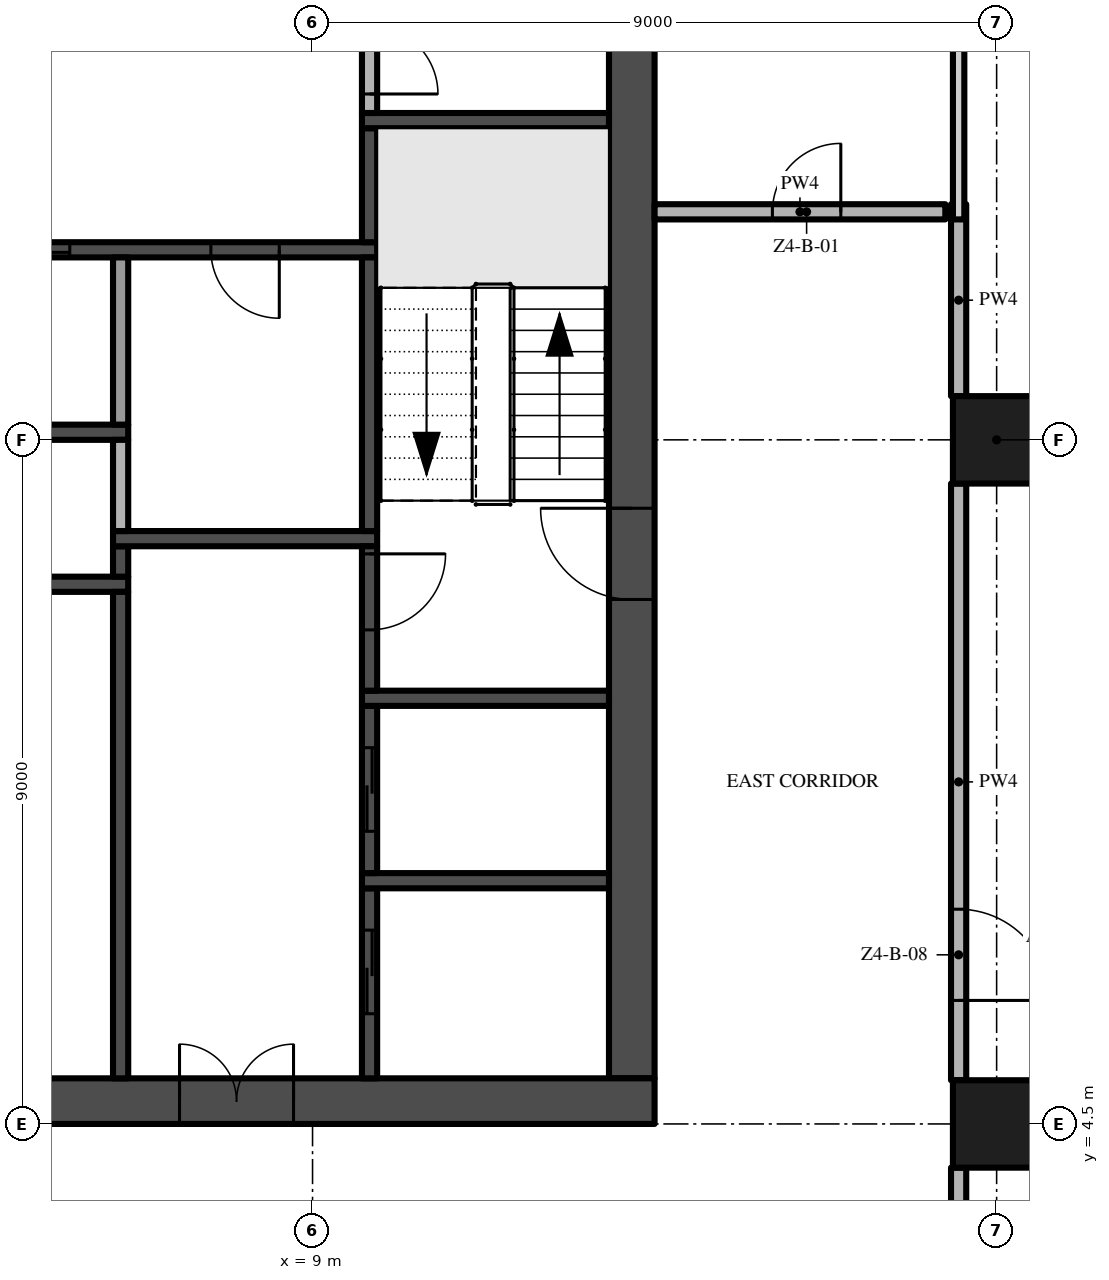
"""IFC4 building model, lengths in metres.
Left out: names, types, materials, properties, quantities, classifications, styles, units other than length and angle.
Written with IfcOpenShell. Run it as: python <this file> out.ifc"""

import sys

from ifc_helpers import new_model, si_unit, direction, frame, frame_2d, origin, origin_2d, place, context, subcontext, project, spatial, rectangle, extrude, element, fill, save


model = new_model("IFC4")
c1 = context("Model", 3, precision=1e-05, world=origin(), true_north=direction((0.0, 1.0)))
c2 = subcontext(c1, "Body", "Model", "MODEL_VIEW")
j1 = project(units=[si_unit("LENGTHUNIT", "METRE"), si_unit("PLANEANGLEUNIT", "RADIAN")], contexts=[c1])
p1 = place(None, origin())
s1 = spatial("IfcSite", under=j1, at=p1, CompositionType="ELEMENT")
p2 = place(p1, origin())
s2 = spatial("IfcBuilding", under=s1, at=p2, CompositionType="ELEMENT")
p3 = place(p2, frame((0.0, 0.0, 195.8)))
s3 = spatial("IfcBuildingStorey", under=s2, at=p3, CompositionType="ELEMENT", Elevation=195.8)
p4 = place(p3, frame((-13.5, 4.8, -0.3), z_axis=(0.0, 0.0, 1.0), x_axis=(1.0, 0.0, 0.0)))
e1 = element("IfcWall", 1, at=p4, inside=s3, PredefinedType="SHEAR", context=c2, shape_type="SweptSolid", body=[
    extrude(rectangle(XDim=27.0, YDim=0.6, at=frame_2d((13.5, 0.0))), origin(), (0.0, 0.0, 1.0), 3.8),
])
p5 = place(p4, frame((12.0, 0.0, 0.3)))
e2 = element("IfcOpeningElement", 2, at=p5, cuts=e1, PredefinedType="OPENING", context=c2, shape_type="SweptSolid", body=[
    extrude(rectangle(XDim=3.0, YDim=2.4, at=frame_2d((1.5, 1.2))), frame((0.0, 0.31, 0.0), z_axis=(0.0, -1.0, 0.0), x_axis=(1.0, 0.0, 0.0)), (0.0, 0.0, 1.0), 0.62),
])
p6 = place(p4, frame((4.9, 0.0, 0.3)))
e3 = element("IfcOpeningElement", 3, at=p6, cuts=e1, PredefinedType="OPENING", context=c2, shape_type="SweptSolid", body=[
    extrude(rectangle(XDim=1.2, YDim=2.2, at=frame_2d((0.6, 1.1))), frame((0.0, 0.31, 0.0), z_axis=(0.0, -1.0, 0.0), x_axis=(1.0, 0.0, 0.0)), (0.0, 0.0, 1.0), 0.62),
])
p7 = place(p4, frame((20.75, 0.0, 0.3)))
e4 = element("IfcOpeningElement", 4, at=p7, cuts=e1, PredefinedType="OPENING", context=c2, shape_type="SweptSolid", body=[
    extrude(rectangle(XDim=1.5, YDim=2.2, at=frame_2d((0.75, 1.1))), frame((0.0, 0.31, 0.0), z_axis=(0.0, -1.0, 0.0), x_axis=(1.0, 0.0, 0.0)), (0.0, 0.0, 1.0), 0.62),
])
p8 = place(p4, frame((17.4, 0.0, 0.3)))
e5 = element("IfcOpeningElement", 5, at=p8, cuts=e1, PredefinedType="OPENING", context=c2, shape_type="SweptSolid", body=[
    extrude(rectangle(XDim=1.2, YDim=2.2, at=frame_2d((0.6, 1.1))), frame((0.0, 0.31, 0.0), z_axis=(0.0, -1.0, 0.0), x_axis=(1.0, 0.0, 0.0)), (0.0, 0.0, 1.0), 0.62),
])
p9 = place(p3, frame((13.2, 5.1, -0.3), z_axis=(0.0, 0.0, 1.0), x_axis=(0.0, 1.0, 0.0)))
e6 = element("IfcWall", 6, at=p9, inside=s3, PredefinedType="SHEAR", context=c2, shape_type="SweptSolid", body=[
    extrude(rectangle(XDim=16.8, YDim=0.6, at=frame_2d((8.4, 0.0))), origin(), (0.0, 0.0, 1.0), 3.8),
])
p10 = place(p9, frame((6.3, 0.0, 0.3)))
e7 = element("IfcOpeningElement", 7, at=p10, cuts=e6, PredefinedType="OPENING", context=c2, shape_type="SweptSolid", body=[
    extrude(rectangle(XDim=1.2, YDim=2.2, at=frame_2d((0.6, 1.1))), frame((0.0, 0.31, 0.0), z_axis=(0.0, -1.0, 0.0), x_axis=(1.0, 0.0, 0.0)), (0.0, 0.0, 1.0), 0.62),
])
for number, where, z_axis, x_axis in (
    (8, (18.0, 13.5, 0.0), (0.0, 0.0, 1.0), (1.0, 0.0, 0.0)),
    (9, (18.0, 4.5, 0.0), (0.0, 0.0, 1.0), (1.0, 0.0, 0.0)),
):
    element("IfcColumn", number, at=place(p3, frame(where, z_axis=z_axis, x_axis=x_axis)), inside=s3, PredefinedType="COLUMN", context=c2, shape_type="SweptSolid", body=[
        extrude(rectangle(XDim=1.15, YDim=1.15, at=origin_2d()), origin(), (0.0, 0.0, 1.0), 3.5),
    ])
for number, where, z_axis, x_axis in (
    (10, (1.5, 11.6, 0.0), (0.0, 0.0, 1.0), (1.0, 0.0, 0.0)),
    (11, (1.5, 13.6, 0.0), (0.0, 0.0, 1.0), (1.0, 0.0, 0.0)),
):
    element("IfcWall", number, at=place(p3, frame(where, z_axis=z_axis, x_axis=x_axis)), inside=s3, PredefinedType="SHEAR", context=c2, shape_type="SweptSolid", body=[
        extrude(rectangle(XDim=5.075, YDim=0.2, at=frame_2d((2.538, 0.0))), origin(), (0.0, 0.0, 1.0), 3.5),
    ])
p11 = place(p3, frame((9.85, 16.0, 0.0), z_axis=(0.0, 0.0, 1.0), x_axis=(-1.0, 0.0, 0.0)))
e12 = element("IfcWall", 12, at=p11, inside=s3, PredefinedType="SHEAR", context=c2, shape_type="SweptSolid", body=[
    extrude(rectangle(XDim=8.35, YDim=0.2, at=frame_2d((4.175, 0.0))), origin(), (0.0, 0.0, 1.0), 3.5),
])
p12 = place(p11, frame((6.481, 0.0, 0.0)))
e13 = element("IfcOpeningElement", 13, at=p12, cuts=e12, PredefinedType="OPENING", context=c2, shape_type="SweptSolid", body=[
    extrude(rectangle(XDim=1.1, YDim=2.1, at=frame_2d((0.55, 1.05))), frame((0.0, 0.11, 0.0), z_axis=(0.0, -1.0, 0.0), x_axis=(1.0, 0.0, 0.0)), (0.0, 0.0, 1.0), 0.22),
])
p13 = place(p11, frame((4.044, 0.0, 0.0)))
e14 = element("IfcOpeningElement", 14, at=p13, cuts=e12, PredefinedType="OPENING", context=c2, shape_type="SweptSolid", body=[
    extrude(rectangle(XDim=1.1, YDim=2.1, at=frame_2d((0.55, 1.05))), frame((0.0, 0.11, 0.0), z_axis=(0.0, -1.0, 0.0), x_axis=(1.0, 0.0, 0.0)), (0.0, 0.0, 1.0), 0.22),
])
p14 = place(p11, frame((1.288, 0.0, 0.0)))
e15 = element("IfcOpeningElement", 15, at=p14, cuts=e12, PredefinedType="OPENING", context=c2, shape_type="SweptSolid", body=[
    extrude(rectangle(XDim=0.9, YDim=2.1, at=frame_2d((0.45, 1.05))), frame((0.0, 0.11, 0.0), z_axis=(0.0, -1.0, 0.0), x_axis=(1.0, 0.0, 0.0)), (0.0, 0.0, 1.0), 0.22),
])
p15 = place(p3, frame((6.475, 5.1, 0.0), z_axis=(0.0, 0.0, 1.0), x_axis=(0.0, 1.0, 0.0)))
e16 = element("IfcWall", 16, at=p15, inside=s3, PredefinedType="SHEAR", context=c2, shape_type="SweptSolid", body=[
    extrude(rectangle(XDim=6.4, YDim=0.2, at=frame_2d((3.2, 0.0))), origin(), (0.0, 0.0, 1.0), 3.5),
])
p16 = place(p3, frame((6.475, 11.7, 0.0), z_axis=(0.0, 0.0, 1.0), x_axis=(0.0, 1.0, 0.0)))
e17 = element("IfcWall", 17, at=p16, inside=s3, PredefinedType="SHEAR", context=c2, shape_type="SweptSolid", body=[
    extrude(rectangle(XDim=0.4, YDim=0.2, at=frame_2d((0.2, 0.0))), origin(), (0.0, 0.0, 1.0), 3.5),
])
p17 = place(p3, frame((6.375, 12.2, 0.0), z_axis=(0.0, 0.0, 1.0), x_axis=(1.0, 0.0, 0.0)))
e18 = element("IfcWall", 18, at=p17, inside=s3, PredefinedType="SHEAR", context=c2, shape_type="SweptSolid", body=[
    extrude(rectangle(XDim=3.475, YDim=0.2, at=frame_2d((1.738, 0.0))), origin(), (0.0, 0.0, 1.0), 3.5),
])
p18 = place(p3, frame((6.475, 12.3, 0.0), z_axis=(0.0, 0.0, 1.0), x_axis=(0.0, 1.0, 0.0)))
e19 = element("IfcWall", 19, at=p18, inside=s3, PredefinedType="PARTITIONING", context=c2, shape_type="SweptSolid", body=[
    extrude(rectangle(XDim=1.2, YDim=0.2, at=frame_2d((0.6, 0.0))), origin(), (0.0, 0.0, 1.0), 3.5),
])
p19 = place(p3, frame((6.475, 13.7, 0.0), z_axis=(0.0, 0.0, 1.0), x_axis=(0.0, 1.0, 0.0)))
e20 = element("IfcWall", 20, at=p19, inside=s3, PredefinedType="PARTITIONING", context=c2, shape_type="SweptSolid", body=[
    extrude(rectangle(XDim=2.2, YDim=0.2, at=frame_2d((1.1, 0.0))), origin(), (0.0, 0.0, 1.0), 3.5),
])
p20 = place(p3, frame((9.75, 5.1, 0.0), z_axis=(0.0, 0.0, 1.0), x_axis=(0.0, 1.0, 0.0)))
e21 = element("IfcWall", 21, at=p20, inside=s3, PredefinedType="SHEAR", context=c2, shape_type="SweptSolid", body=[
    extrude(rectangle(XDim=2.5, YDim=0.2, at=frame_2d((1.25, 0.0))), origin(), (0.0, 0.0, 1.0), 3.5),
])
p21 = place(p20, frame((0.85, 0.0, 0.0)))
e22 = element("IfcOpeningElement", 22, at=p21, cuts=e21, PredefinedType="OPENING", context=c2, shape_type="SweptSolid", body=[
    extrude(rectangle(XDim=1.1, YDim=2.1, at=frame_2d((0.55, 1.05))), frame((0.0, 0.11, 0.0), z_axis=(0.0, -1.0, 0.0), x_axis=(1.0, 0.0, 0.0)), (0.0, 0.0, 1.0), 0.22),
])
p22 = place(p3, frame((9.65, 7.7, 0.0), z_axis=(0.0, 0.0, 1.0), x_axis=(1.0, 0.0, 0.0)))
e23 = element("IfcWall", 23, at=p22, inside=s3, PredefinedType="SHEAR", context=c2, shape_type="SweptSolid", body=[
    extrude(rectangle(XDim=3.25, YDim=0.2, at=frame_2d((1.625, 0.0))), origin(), (0.0, 0.0, 1.0), 3.5),
])
p23 = place(p3, frame((9.75, 7.8, 0.0), z_axis=(0.0, 0.0, 1.0), x_axis=(0.0, 1.0, 0.0)))
e24 = element("IfcWall", 24, at=p23, inside=s3, PredefinedType="SHEAR", context=c2, shape_type="SweptSolid", body=[
    extrude(rectangle(XDim=2.2, YDim=0.2, at=frame_2d((1.1, 0.0))), origin(), (0.0, 0.0, 1.0), 3.5),
])
p24 = place(p23, frame((0.55, 0.0, 0.0)))
e25 = element("IfcOpeningElement", 25, at=p24, cuts=e24, PredefinedType="OPENING", context=c2, shape_type="SweptSolid", body=[
    extrude(rectangle(XDim=1.1, YDim=2.1, at=frame_2d((0.55, 1.05))), frame((0.0, 0.11, 0.0), z_axis=(0.0, -1.0, 0.0), x_axis=(1.0, 0.0, 0.0)), (0.0, 0.0, 1.0), 0.22),
])
p25 = place(p3, frame((9.65, 10.1, 0.0), z_axis=(0.0, 0.0, 1.0), x_axis=(1.0, 0.0, 0.0)))
e26 = element("IfcWall", 26, at=p25, inside=s3, PredefinedType="SHEAR", context=c2, shape_type="SweptSolid", body=[
    extrude(rectangle(XDim=3.25, YDim=0.2, at=frame_2d((1.625, 0.0))), origin(), (0.0, 0.0, 1.0), 3.5),
])
p26 = place(p3, frame((9.75, 12.1, 0.0), z_axis=(0.0, 0.0, 1.0), x_axis=(0.0, -1.0, 0.0)))
e27 = element("IfcWall", 27, at=p26, inside=s3, PredefinedType="SHEAR", context=c2, shape_type="SweptSolid", body=[
    extrude(rectangle(XDim=1.9, YDim=0.2, at=frame_2d((0.95, 0.0))), origin(), (0.0, 0.0, 1.0), 3.5),
])
p27 = place(p26, frame((0.1, 0.0, 0.0)))
e28 = element("IfcOpeningElement", 28, at=p27, cuts=e27, PredefinedType="OPENING", context=c2, shape_type="SweptSolid", body=[
    extrude(rectangle(XDim=1.0, YDim=2.2, at=frame_2d((0.5, 1.1))), frame((0.0, 0.11, 0.0), z_axis=(0.0, -1.0, 0.0), x_axis=(1.0, 0.0, 0.0)), (0.0, 0.0, 1.0), 0.22),
])
p28 = place(p3, frame((9.75, 12.3, 0.0), z_axis=(0.0, 0.0, 1.0), x_axis=(0.0, 1.0, 0.0)))
e29 = element("IfcWall", 29, at=p28, inside=s3, PredefinedType="SHEAR", context=c2, shape_type="SweptSolid", body=[
    extrude(rectangle(XDim=3.6, YDim=0.2, at=frame_2d((1.8, 0.0))), origin(), (0.0, 0.0, 1.0), 3.5),
])
p29 = place(p3, frame((9.75, 16.1, 0.0), z_axis=(0.0, 0.0, 1.0), x_axis=(0.0, 1.0, 0.0)))
e30 = element("IfcWall", 30, at=p29, inside=s3, PredefinedType="SHEAR", context=c2, shape_type="SweptSolid", body=[
    extrude(rectangle(XDim=1.5, YDim=0.2, at=frame_2d((0.75, 0.0))), origin(), (0.0, 0.0, 1.0), 3.5),
])
p30 = place(p3, frame((9.65, 17.7, 0.0), z_axis=(0.0, 0.0, 1.0), x_axis=(1.0, 0.0, 0.0)))
e31 = element("IfcWall", 31, at=p30, inside=s3, PredefinedType="SHEAR", context=c2, shape_type="SweptSolid", body=[
    extrude(rectangle(XDim=3.25, YDim=0.2, at=frame_2d((1.625, 0.0))), origin(), (0.0, 0.0, 1.0), 3.5),
])
p31 = place(p3, frame((9.75, 19.2, 0.0), z_axis=(0.0, 0.0, 1.0), x_axis=(0.0, -1.0, 0.0)))
e32 = element("IfcWall", 32, at=p31, inside=s3, PredefinedType="PARTITIONING", context=c2, shape_type="SweptSolid", body=[
    extrude(rectangle(XDim=1.4, YDim=0.2, at=frame_2d((0.7, 0.0))), origin(), (0.0, 0.0, 1.0), 3.5),
])
p32 = place(p31, frame((0.25, 0.0, 0.0)))
e33 = element("IfcOpeningElement", 33, at=p32, cuts=e32, PredefinedType="OPENING", context=c2, shape_type="SweptSolid", body=[
    extrude(rectangle(XDim=0.9, YDim=2.1, at=frame_2d((0.45, 1.05))), frame((0.0, 0.11, 0.0), z_axis=(0.0, -1.0, 0.0), x_axis=(1.0, 0.0, 0.0)), (0.0, 0.0, 1.0), 0.22),
])
p33 = place(p3, frame((13.5, 16.5, 0.0), z_axis=(0.0, 0.0, 1.0), x_axis=(1.0, 0.0, 0.0)))
e34 = element("IfcWall", 34, at=p33, inside=s3, PredefinedType="PARTITIONING", context=c2, shape_type="SweptSolid", body=[
    extrude(rectangle(XDim=3.825, YDim=0.2, at=frame_2d((1.913, 0.0))), origin(), (0.0, 0.0, 1.0), 3.5),
])
p34 = place(p33, frame((1.55, 0.0, 0.0)))
e35 = element("IfcOpeningElement", 35, at=p34, cuts=e34, PredefinedType="OPENING", context=c2, shape_type="SweptSolid", body=[
    extrude(rectangle(XDim=0.9, YDim=2.1, at=frame_2d((0.45, 1.05))), frame((0.0, 0.11, 0.0), z_axis=(0.0, -1.0, 0.0), x_axis=(1.0, 0.0, 0.0)), (0.0, 0.0, 1.0), 0.22),
])
p35 = place(p3, frame((17.5, -0.2, 0.0), z_axis=(0.0, 0.0, 1.0), x_axis=(0.0, 1.0, 0.0)))
e36 = element("IfcWall", 36, at=p35, inside=s3, PredefinedType="PARTITIONING", context=c2, shape_type="SweptSolid", body=[
    extrude(rectangle(XDim=4.125, YDim=0.2, at=frame_2d((2.062, 0.0))), origin(), (0.0, 0.0, 1.0), 3.5),
])
p36 = place(p3, frame((17.5, 12.925, 0.0), z_axis=(0.0, 0.0, 1.0), x_axis=(0.0, -1.0, 0.0)))
e37 = element("IfcWall", 37, at=p36, inside=s3, PredefinedType="PARTITIONING", context=c2, shape_type="SweptSolid", body=[
    extrude(rectangle(XDim=7.85, YDim=0.2, at=frame_2d((3.925, 0.0))), origin(), (0.0, 0.0, 1.0), 3.5),
])
p37 = place(p36, frame((5.6, 0.0, 0.0)))
e38 = element("IfcOpeningElement", 38, at=p37, cuts=e37, PredefinedType="OPENING", context=c2, shape_type="SweptSolid", body=[
    extrude(rectangle(XDim=1.2, YDim=2.4, at=frame_2d((0.6, 1.2))), frame((0.0, 0.11, 0.0), z_axis=(0.0, -1.0, 0.0), x_axis=(1.0, 0.0, 0.0)), (0.0, 0.0, 1.0), 0.22),
])
p38 = place(p3, frame((17.5, 14.075, 0.0), z_axis=(0.0, 0.0, 1.0), x_axis=(0.0, 1.0, 0.0)))
e39 = element("IfcWall", 39, at=p38, inside=s3, PredefinedType="PARTITIONING", context=c2, shape_type="SweptSolid", body=[
    extrude(rectangle(XDim=2.525, YDim=0.2, at=frame_2d((1.262, 0.0))), origin(), (0.0, 0.0, 1.0), 3.5),
])
p39 = place(p3, frame((17.5, 16.4, 0.0), z_axis=(0.0, 0.0, 1.0), x_axis=(0.0, 1.0, 0.0)))
e40 = element("IfcWall", 40, at=p39, inside=s3, PredefinedType="PARTITIONING", context=c2, shape_type="SweptSolid", body=[
    extrude(rectangle(XDim=5.05, YDim=0.15, at=frame_2d((2.525, 0.0))), origin(), (0.0, 0.0, 1.0), 3.5),
])
p40 = place(p10, frame((1.2, 0.0, 0.0), z_axis=(0.0, 0.0, 1.0), x_axis=(-1.0, 0.0, 0.0)))
e41 = element("IfcDoor", 41, at=p40, inside=s3, OperationType="SINGLE_SWING_LEFT", PredefinedType="DOOR", context=c2, shape_type="SweptSolid", body=[
    extrude(rectangle(XDim=1.2, YDim=2.2, at=frame_2d((0.6, 1.1))), frame((0.0, 0.025, 0.0), z_axis=(0.0, -1.0, 0.0), x_axis=(1.0, 0.0, 0.0)), (0.0, 0.0, 1.0), 0.05),
])
fill(e7, e41)
p41 = place(p7, frame((1.5, 0.0, 0.0), z_axis=(0.0, 0.0, 1.0), x_axis=(-1.0, 0.0, 0.0)))
e42 = element("IfcDoor", 42, at=p41, inside=s3, OperationType="DOUBLE_DOOR_SINGLE_SWING", PredefinedType="DOOR", context=c2, shape_type="SweptSolid", body=[
    extrude(rectangle(XDim=1.5, YDim=2.2, at=frame_2d((0.75, 1.1))), frame((0.0, 0.025, 0.0), z_axis=(0.0, -1.0, 0.0), x_axis=(1.0, 0.0, 0.0)), (0.0, 0.0, 1.0), 0.05),
])
fill(e4, e42)
p42 = place(p27, origin())
e43 = element("IfcDoor", 43, at=p42, inside=s3, OperationType="SINGLE_SWING_LEFT", PredefinedType="DOOR", context=c2, shape_type="SweptSolid", body=[
    extrude(rectangle(XDim=1.0, YDim=2.2, at=frame_2d((0.5, 1.1))), frame((0.0, 0.025, 0.0), z_axis=(0.0, -1.0, 0.0), x_axis=(1.0, 0.0, 0.0)), (0.0, 0.0, 1.0), 0.05),
])
fill(e28, e43)
p43 = place(p13, origin())
e44 = element("IfcDoor", 44, at=p43, inside=s3, OperationType="SLIDING_TO_RIGHT", PredefinedType="DOOR", context=c2, shape_type="SweptSolid", body=[
    extrude(rectangle(XDim=1.1, YDim=2.1, at=frame_2d((0.55, 1.05))), frame((0.0, 0.025, 0.0), z_axis=(0.0, -1.0, 0.0), x_axis=(1.0, 0.0, 0.0)), (0.0, 0.0, 1.0), 0.05),
])
fill(e14, e44)
p44 = place(p21, origin())
e45 = element("IfcDoor", 45, at=p44, inside=s3, OperationType="SLIDING_TO_RIGHT", PredefinedType="DOOR", context=c2, shape_type="SweptSolid", body=[
    extrude(rectangle(XDim=1.1, YDim=2.1, at=frame_2d((0.55, 1.05))), frame((0.0, 0.025, 0.0), z_axis=(0.0, -1.0, 0.0), x_axis=(1.0, 0.0, 0.0)), (0.0, 0.0, 1.0), 0.05),
])
fill(e22, e45)
p45 = place(p24, origin())
e46 = element("IfcDoor", 46, at=p45, inside=s3, OperationType="SLIDING_TO_RIGHT", PredefinedType="DOOR", context=c2, shape_type="SweptSolid", body=[
    extrude(rectangle(XDim=1.1, YDim=2.1, at=frame_2d((0.55, 1.05))), frame((0.0, 0.025, 0.0), z_axis=(0.0, -1.0, 0.0), x_axis=(1.0, 0.0, 0.0)), (0.0, 0.0, 1.0), 0.05),
])
fill(e25, e46)
p46 = place(p14, origin())
e47 = element("IfcDoor", 47, at=p46, inside=s3, OperationType="SINGLE_SWING_LEFT", PredefinedType="DOOR", context=c2, shape_type="SweptSolid", body=[
    extrude(rectangle(XDim=0.9, YDim=2.1, at=frame_2d((0.45, 1.05))), frame((0.0, 0.025, 0.0), z_axis=(0.0, -1.0, 0.0), x_axis=(1.0, 0.0, 0.0)), (0.0, 0.0, 1.0), 0.05),
])
fill(e15, e47)
p47 = place(p32, origin())
e48 = element("IfcDoor", 48, at=p47, inside=s3, OperationType="SINGLE_SWING_RIGHT", PredefinedType="DOOR", context=c2, shape_type="SweptSolid", body=[
    extrude(rectangle(XDim=0.9, YDim=2.1, at=frame_2d((0.45, 1.05))), frame((0.0, 0.025, 0.0), z_axis=(0.0, -1.0, 0.0), x_axis=(1.0, 0.0, 0.0)), (0.0, 0.0, 1.0), 0.05),
])
fill(e33, e48)
p48 = place(p34, origin())
e49 = element("IfcDoor", 49, at=p48, inside=s3, OperationType="SINGLE_SWING_RIGHT", PredefinedType="DOOR", context=c2, shape_type="SweptSolid", body=[
    extrude(rectangle(XDim=0.9, YDim=2.1, at=frame_2d((0.45, 1.05))), frame((0.0, 0.025, 0.0), z_axis=(0.0, -1.0, 0.0), x_axis=(1.0, 0.0, 0.0)), (0.0, 0.0, 1.0), 0.05),
])
fill(e35, e49)
p49 = place(p37, origin())
e50 = element("IfcDoor", 50, at=p49, inside=s3, OperationType="SINGLE_SWING_RIGHT", PredefinedType="DOOR", context=c2, shape_type="SweptSolid", body=[
    extrude(rectangle(XDim=1.2, YDim=2.4, at=frame_2d((0.6, 1.2))), frame((0.0, 0.025, 0.0), z_axis=(0.0, -1.0, 0.0), x_axis=(1.0, 0.0, 0.0)), (0.0, 0.0, 1.0), 0.05),
])
fill(e38, e50)
save(model, sys.argv[1])
